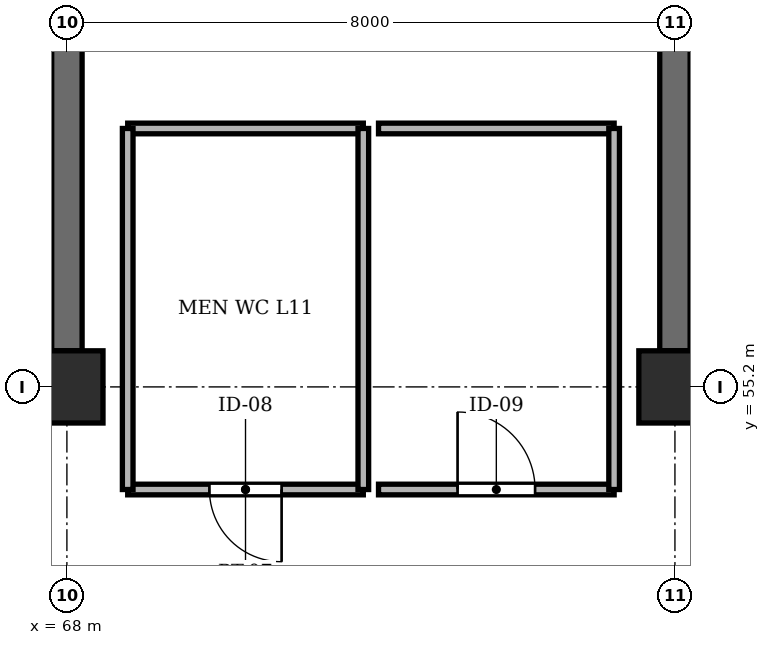
"""IFC4 building model, lengths in metres.
Left out: names, types, materials, properties, quantities, classifications, styles, units other than length and angle.
Written with IfcOpenShell. Run it as: python <this file> out.ifc"""

import sys

from ifc_helpers import new_model, si_unit, direction, frame, frame_2d, origin, origin_2d, place, context, subcontext, project, spatial, rectangle, extrude, element, fill, save


model = new_model("IFC4")
c1 = context("Model", 3, precision=1e-05, world=origin(), true_north=direction((0.0, 1.0)))
c2 = subcontext(c1, "Body", "Model", "MODEL_VIEW")
j1 = project(units=[si_unit("LENGTHUNIT", "METRE"), si_unit("PLANEANGLEUNIT", "RADIAN")], contexts=[c1])
p1 = place(None, origin())
s1 = spatial("IfcSite", under=j1, at=p1, CompositionType="ELEMENT")
p2 = place(p1, origin())
s2 = spatial("IfcBuilding", under=s1, at=p2, CompositionType="ELEMENT")
p3 = place(p2, frame((0.0, 0.0, 47.05)))
s3 = spatial("IfcBuildingStorey", under=s2, at=p3, CompositionType="ELEMENT", Elevation=47.05)
for number, where, z_axis, x_axis in (
    (1, (68.0, 55.2, -0.23), (0.0, 0.0, 1.0), (1.0, 0.0, 0.0)),
    (2, (76.0, 55.2, -0.23), (0.0, 0.0, 1.0), (1.0, 0.0, 0.0)),
):
    element("IfcColumn", number, at=place(p3, frame(where, z_axis=z_axis, x_axis=x_axis)), inside=s3, PredefinedType="COLUMN", context=c2, shape_type="SweptSolid", body=[
        extrude(rectangle(XDim=0.95, YDim=0.95, at=origin_2d()), origin(), (0.0, 0.0, 1.0), 3.25),
    ])
for number, where, z_axis, x_axis in (
    (3, (68.0, 55.675, 0.0), (0.0, 0.0, 1.0), (0.0, 1.0, 0.0)),
    (4, (76.0, 55.675, 0.0), (0.0, 0.0, 1.0), (0.0, 1.0, 0.0)),
):
    element("IfcWall", number, at=place(p3, frame(where, z_axis=z_axis, x_axis=x_axis)), inside=s3, PredefinedType="SHEAR", context=c2, shape_type="SweptSolid", body=[
        extrude(rectangle(XDim=6.325, YDim=0.4, at=frame_2d((3.163, 0.0))), origin(), (0.0, 0.0, 1.0), 3.02),
    ])
p4 = place(p3, frame((68.8, 53.85, 0.0), z_axis=(0.0, 0.0, 1.0), x_axis=(1.0, 0.0, 0.0)))
e5 = element("IfcWall", 5, at=p4, inside=s3, PredefinedType="PARTITIONING", context=c2, shape_type="SweptSolid", body=[
    extrude(rectangle(XDim=3.1, YDim=0.14, at=frame_2d((1.55, 0.0))), origin(), (0.0, 0.0, 1.0), 2.53),
])
p5 = place(p4, frame((1.075, 0.0, 0.0)))
e6 = element("IfcOpeningElement", 6, at=p5, cuts=e5, PredefinedType="OPENING", context=c2, shape_type="SweptSolid", body=[
    extrude(rectangle(XDim=0.95, YDim=2.1, at=frame_2d((0.475, 1.05))), frame((0.0, 0.082, 0.0), z_axis=(0.0, -1.0, 0.0), x_axis=(1.0, 0.0, 0.0)), (0.0, 0.0, 1.0), 0.164),
])
p6 = place(p3, frame((68.8, 58.6, 0.0), z_axis=(0.0, 0.0, 1.0), x_axis=(1.0, 0.0, 0.0)))
e7 = element("IfcWall", 7, at=p6, inside=s3, PredefinedType="PARTITIONING", context=c2, shape_type="SweptSolid", body=[
    extrude(rectangle(XDim=3.1, YDim=0.14, at=frame_2d((1.55, 0.0))), origin(), (0.0, 0.0, 1.0), 2.53),
])
for number, where, z_axis, x_axis in (
    (8, (68.8, 53.85, 0.0), (0.0, 0.0, 1.0), (0.0, 1.0, 0.0)),
    (9, (71.9, 53.85, 0.0), (0.0, 0.0, 1.0), (0.0, 1.0, 0.0)),
):
    element("IfcWall", number, at=place(p3, frame(where, z_axis=z_axis, x_axis=x_axis)), inside=s3, PredefinedType="PARTITIONING", context=c2, shape_type="SweptSolid", body=[
        extrude(rectangle(XDim=4.75, YDim=0.14, at=frame_2d((2.375, 0.0))), origin(), (0.0, 0.0, 1.0), 2.53),
    ])
p7 = place(p3, frame((72.1, 53.85, 0.0), z_axis=(0.0, 0.0, 1.0), x_axis=(1.0, 0.0, 0.0)))
e10 = element("IfcWall", 10, at=p7, inside=s3, PredefinedType="PARTITIONING", context=c2, shape_type="SweptSolid", body=[
    extrude(rectangle(XDim=3.1, YDim=0.14, at=frame_2d((1.55, 0.0))), origin(), (0.0, 0.0, 1.0), 2.53),
])
p8 = place(p7, frame((1.04, 0.0, 0.0)))
e11 = element("IfcOpeningElement", 11, at=p8, cuts=e10, PredefinedType="OPENING", context=c2, shape_type="SweptSolid", body=[
    extrude(rectangle(XDim=1.02, YDim=2.1, at=frame_2d((0.51, 1.05))), frame((0.0, 0.082, 0.0), z_axis=(0.0, -1.0, 0.0), x_axis=(1.0, 0.0, 0.0)), (0.0, 0.0, 1.0), 0.164),
])
p9 = place(p3, frame((72.1, 58.6, 0.0), z_axis=(0.0, 0.0, 1.0), x_axis=(1.0, 0.0, 0.0)))
e12 = element("IfcWall", 12, at=p9, inside=s3, PredefinedType="PARTITIONING", context=c2, shape_type="SweptSolid", body=[
    extrude(rectangle(XDim=3.1, YDim=0.14, at=frame_2d((1.55, 0.0))), origin(), (0.0, 0.0, 1.0), 2.53),
])
p10 = place(p3, frame((75.2, 53.85, 0.0), z_axis=(0.0, 0.0, 1.0), x_axis=(0.0, 1.0, 0.0)))
e13 = element("IfcWall", 13, at=p10, inside=s3, PredefinedType="PARTITIONING", context=c2, shape_type="SweptSolid", body=[
    extrude(rectangle(XDim=4.75, YDim=0.14, at=frame_2d((2.375, 0.0))), origin(), (0.0, 0.0, 1.0), 2.53),
])
p11 = place(p5, frame((0.95, 0.0, 0.0), z_axis=(0.0, 0.0, 1.0), x_axis=(-1.0, 0.0, 0.0)))
e14 = element("IfcDoor", 14, at=p11, inside=s3, OperationType="SINGLE_SWING_RIGHT", PredefinedType="DOOR", context=c2, shape_type="SweptSolid", body=[
    extrude(rectangle(XDim=0.95, YDim=2.1, at=frame_2d((0.475, 1.05))), frame((0.0, 0.025, 0.0), z_axis=(0.0, -1.0, 0.0), x_axis=(1.0, 0.0, 0.0)), (0.0, 0.0, 1.0), 0.05),
])
fill(e6, e14)
p12 = place(p8, origin())
e15 = element("IfcDoor", 15, at=p12, inside=s3, OperationType="SINGLE_SWING_LEFT", PredefinedType="DOOR", context=c2, shape_type="SweptSolid", body=[
    extrude(rectangle(XDim=1.02, YDim=2.1, at=frame_2d((0.51, 1.05))), frame((0.0, 0.025, 0.0), z_axis=(0.0, -1.0, 0.0), x_axis=(1.0, 0.0, 0.0)), (0.0, 0.0, 1.0), 0.05),
])
fill(e11, e15)
save(model, sys.argv[1])
